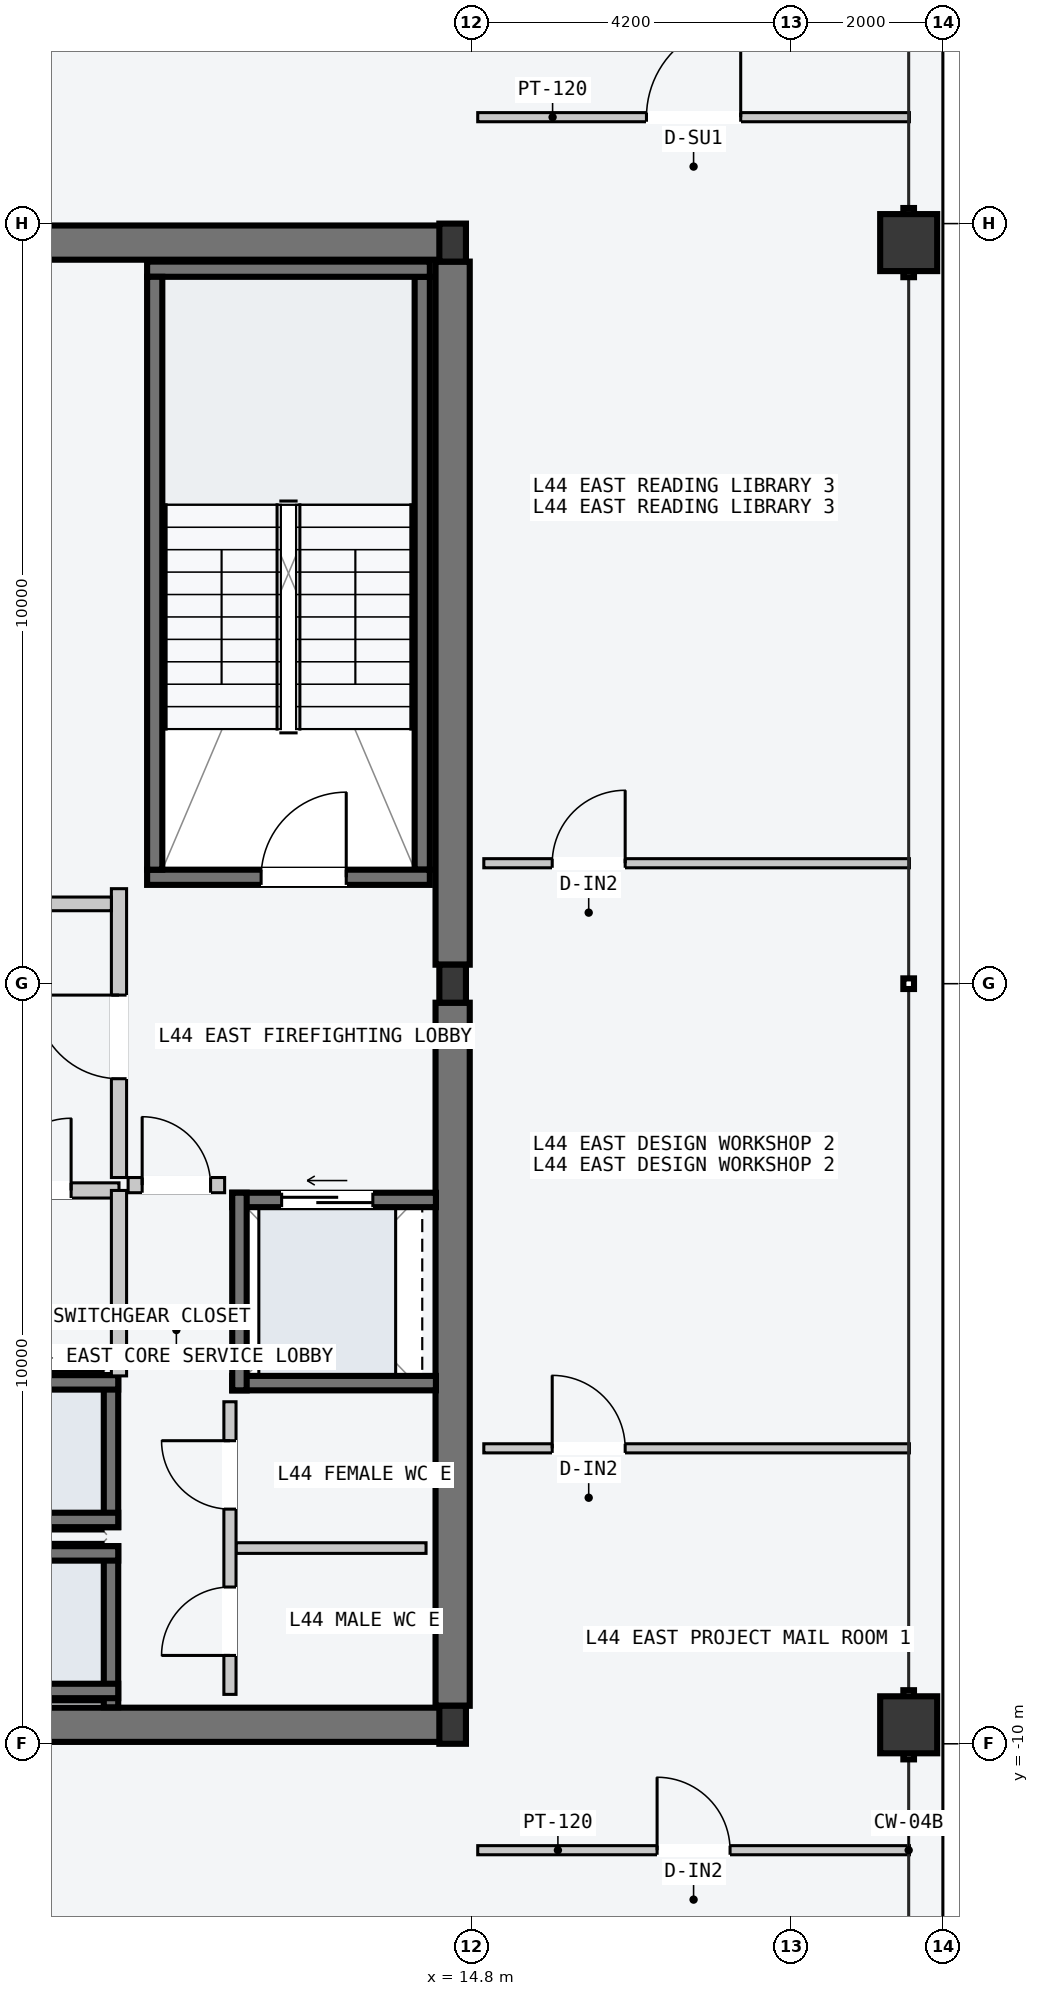
"""IFC4 building model, lengths in metres.
Left out: names, types, materials, properties, quantities, classifications, styles, units other than length and angle.
Written with IfcOpenShell. Run it as: python <this file> out.ifc"""

import sys

from ifc_helpers import new_model, si_unit, direction, frame, frame_2d, origin, origin_2d, place, context, subcontext, project, spatial, rectangle, hollow_rectangle, i_section, extrude, element, fill, save


model = new_model("IFC4")
c1 = context("Model", 3, precision=1e-05, world=origin(), true_north=direction((0.0, 1.0)))
c2 = subcontext(c1, "Body", "Model", "MODEL_VIEW")
j1 = project(units=[si_unit("LENGTHUNIT", "METRE"), si_unit("PLANEANGLEUNIT", "RADIAN")], contexts=[c1])
p1 = place(None, origin())
s1 = spatial("IfcSite", under=j1, at=p1, CompositionType="ELEMENT")
p2 = place(p1, origin())
s2 = spatial("IfcBuilding", under=s1, at=p2, CompositionType="ELEMENT")
p3 = place(p2, frame((0.0, 0.0, 169.5)))
s3 = spatial("IfcBuildingStorey", under=s2, at=p3, CompositionType="ELEMENT", Elevation=169.5)
for number, where, z_axis, x_axis in (
    (1, (8.07, -9.75, -0.2), (0.0, 0.0, 1.0), (1.0, 0.0, 0.0)),
    (2, (8.07, 9.75, -0.2), (0.0, 0.0, 1.0), (1.0, 0.0, 0.0)),
):
    element("IfcWall", number, at=place(p3, frame(where, z_axis=z_axis, x_axis=x_axis)), inside=s3, PredefinedType="SHEAR", context=c2, shape_type="SweptSolid", body=[
        extrude(rectangle(XDim=6.46, YDim=0.45, at=frame_2d((3.23, 0.0))), origin(), (0.0, 0.0, 1.0), 3.6),
    ])
for number, where, z_axis, x_axis in (
    (3, (14.55, -9.5, -0.2), (0.0, 0.0, 1.0), (0.0, 1.0, 0.0)),
    (4, (14.55, 0.25, -0.2), (0.0, 0.0, 1.0), (0.0, 1.0, 0.0)),
):
    element("IfcWall", number, at=place(p3, frame(where, z_axis=z_axis, x_axis=x_axis)), inside=s3, PredefinedType="SHEAR", context=c2, shape_type="SweptSolid", body=[
        extrude(rectangle(XDim=9.25, YDim=0.45, at=frame_2d((4.625, 0.0))), origin(), (0.0, 0.0, 1.0), 3.6),
    ])
p4 = place(p3, frame((14.15, 1.5, -0.2), z_axis=(0.0, 0.0, 1.0), x_axis=(0.0, 1.0, 0.0)))
e5 = element("IfcWall", 5, at=p4, inside=s3, PredefinedType="SOLIDWALL", context=c2, shape_type="SweptSolid", body=[
    extrude(rectangle(XDim=7.8, YDim=0.2, at=frame_2d((3.9, 0.0))), origin(), (0.0, 0.0, 1.0), 3.6),
])
p5 = place(p3, frame((10.53, 1.4, -0.2), z_axis=(0.0, 0.0, 1.0), x_axis=(1.0, 0.0, 0.0)))
e6 = element("IfcWall", 6, at=p5, inside=s3, PredefinedType="SOLIDWALL", context=c2, shape_type="SweptSolid", body=[
    extrude(rectangle(XDim=3.72, YDim=0.2, at=frame_2d((1.86, 0.0))), origin(), (0.0, 0.0, 1.0), 3.6),
])
p6 = place(p5, frame((1.5, 0.0, 0.2)))
e7 = element("IfcOpeningElement", 7, at=p6, cuts=e6, PredefinedType="OPENING", context=c2, shape_type="SweptSolid", body=[
    extrude(rectangle(XDim=1.12, YDim=2.18, at=frame_2d((0.56, 1.09))), frame((0.0, 0.11, 0.0), z_axis=(0.0, -1.0, 0.0), x_axis=(1.0, 0.0, 0.0)), (0.0, 0.0, 1.0), 0.22),
])
p7 = place(p3, frame((10.53, 9.4, -0.2), z_axis=(0.0, 0.0, 1.0), x_axis=(1.0, 0.0, 0.0)))
e8 = element("IfcWall", 8, at=p7, inside=s3, PredefinedType="SOLIDWALL", context=c2, shape_type="SweptSolid", body=[
    extrude(rectangle(XDim=3.72, YDim=0.2, at=frame_2d((1.86, 0.0))), origin(), (0.0, 0.0, 1.0), 3.6),
])
p8 = place(p3, frame((10.63, 1.5, -0.2), z_axis=(0.0, 0.0, 1.0), x_axis=(0.0, 1.0, 0.0)))
e9 = element("IfcWall", 9, at=p8, inside=s3, PredefinedType="SOLIDWALL", context=c2, shape_type="SweptSolid", body=[
    extrude(rectangle(XDim=7.8, YDim=0.2, at=frame_2d((3.9, 0.0))), origin(), (0.0, 0.0, 1.0), 3.6),
])
for number, where, z_axis, x_axis in (
    (10, (14.55, -9.75, 0.0), (0.0, 0.0, 1.0), (1.0, 0.0, 0.0)),
    (11, (14.55, 0.0, 0.0), (0.0, 0.0, 1.0), (1.0, 0.0, 0.0)),
    (12, (14.55, 9.75, 0.0), (0.0, 0.0, 1.0), (1.0, 0.0, 0.0)),
):
    element("IfcColumn", number, at=place(p3, frame(where, z_axis=z_axis, x_axis=x_axis)), inside=s3, PredefinedType="COLUMN", context=c2, shape_type="SweptSolid", body=[
        extrude(i_section(OverallWidth=0.35, OverallDepth=0.5, WebThickness=0.02, FlangeThickness=0.032, at=origin_2d()), origin(), (0.0, 0.0, 1.0), 3.6),
    ])
for number, where, z_axis, x_axis in (
    (13, (20.55, -9.75, 0.0), (0.0, 0.0, 1.0), (0.0, 1.0, 0.0)),
    (14, (20.55, 9.75, 0.0), (0.0, 0.0, 1.0), (0.0, 1.0, 0.0)),
):
    element("IfcColumn", number, at=place(p3, frame(where, z_axis=z_axis, x_axis=x_axis)), inside=s3, PredefinedType="COLUMN", context=c2, shape_type="SweptSolid", body=[
        extrude(hollow_rectangle(XDim=0.75, YDim=0.75, WallThickness=0.032, at=origin_2d()), origin(), (0.0, 0.0, 1.0), 3.6),
    ])
p9 = place(p3, frame((10.055, -9.52, -0.2), z_axis=(0.0, 0.0, 1.0), x_axis=(0.0, 1.0, 0.0)))
e15 = element("IfcWall", 15, at=p9, inside=s3, PredefinedType="SOLIDWALL", context=c2, shape_type="SweptSolid", body=[
    extrude(rectangle(XDim=2.12, YDim=0.19, at=frame_2d((1.06, 0.0))), origin(), (0.0, 0.0, 1.0), 3.6),
])
for number, where, z_axis, x_axis in (
    (16, (7.95, -7.495, -0.2), (0.0, 0.0, 1.0), (1.0, 0.0, 0.0)),
    (17, (7.95, -9.305, -0.2), (0.0, 0.0, 1.0), (1.0, 0.0, 0.0)),
):
    element("IfcWall", number, at=place(p3, frame(where, z_axis=z_axis, x_axis=x_axis)), inside=s3, PredefinedType="SOLIDWALL", context=c2, shape_type="SweptSolid", body=[
        extrude(rectangle(XDim=2.2, YDim=0.19, at=frame_2d((1.1, 0.0))), origin(), (0.0, 0.0, 1.0), 3.6),
    ])
p10 = place(p3, frame((10.055, -7.15, -0.2), z_axis=(0.0, 0.0, 1.0), x_axis=(0.0, 1.0, 0.0)))
e18 = element("IfcWall", 18, at=p10, inside=s3, PredefinedType="SOLIDWALL", context=c2, shape_type="SweptSolid", body=[
    extrude(rectangle(XDim=2.0, YDim=0.19, at=frame_2d((1.0, 0.0))), origin(), (0.0, 0.0, 1.0), 3.6),
])
for number, where, z_axis, x_axis in (
    (19, (7.95, -5.245, -0.2), (0.0, 0.0, 1.0), (1.0, 0.0, 0.0)),
    (20, (7.95, -7.055, -0.2), (0.0, 0.0, 1.0), (1.0, 0.0, 0.0)),
):
    element("IfcWall", number, at=place(p3, frame(where, z_axis=z_axis, x_axis=x_axis)), inside=s3, PredefinedType="SOLIDWALL", context=c2, shape_type="SweptSolid", body=[
        extrude(rectangle(XDim=2.2, YDim=0.19, at=frame_2d((1.1, 0.0))), origin(), (0.0, 0.0, 1.0), 3.6),
    ])
p11 = place(p3, frame((11.65, -2.845, -0.2), z_axis=(0.0, 0.0, 1.0), x_axis=(1.0, 0.0, 0.0)))
e21 = element("IfcWall", 21, at=p11, inside=s3, PredefinedType="SOLIDWALL", context=c2, shape_type="SweptSolid", body=[
    extrude(rectangle(XDim=2.68, YDim=0.19, at=frame_2d((1.34, 0.0))), origin(), (0.0, 0.0, 1.0), 3.6),
])
p12 = place(p11, frame((0.65, 0.0, 0.2)))
e22 = element("IfcOpeningElement", 22, at=p12, cuts=e21, PredefinedType="OPENING", context=c2, shape_type="SweptSolid", body=[
    extrude(rectangle(XDim=1.2, YDim=2.2, at=frame_2d((0.6, 1.1))), frame((0.0, 0.105, 0.0), z_axis=(0.0, -1.0, 0.0), x_axis=(1.0, 0.0, 0.0)), (0.0, 0.0, 1.0), 0.21),
])
p13 = place(p3, frame((11.65, -5.255, -0.2), z_axis=(0.0, 0.0, 1.0), x_axis=(1.0, 0.0, 0.0)))
e23 = element("IfcWall", 23, at=p13, inside=s3, PredefinedType="SOLIDWALL", context=c2, shape_type="SweptSolid", body=[
    extrude(rectangle(XDim=2.68, YDim=0.19, at=frame_2d((1.34, 0.0))), origin(), (0.0, 0.0, 1.0), 3.6),
])
p14 = place(p3, frame((11.745, -5.35, -0.2), z_axis=(0.0, 0.0, 1.0), x_axis=(0.0, 1.0, 0.0)))
e24 = element("IfcWall", 24, at=p14, inside=s3, PredefinedType="SOLIDWALL", context=c2, shape_type="SweptSolid", body=[
    extrude(rectangle(XDim=2.6, YDim=0.19, at=frame_2d((1.3, 0.0))), origin(), (0.0, 0.0, 1.0), 3.6),
])
p15 = place(p3, frame((10.16, -2.55, 0.0), z_axis=(0.0, 0.0, 1.0), x_axis=(0.0, 1.0, 0.0)))
e25 = element("IfcWall", 25, at=p15, inside=s3, PredefinedType="PARTITIONING", context=c2, shape_type="SweptSolid", body=[
    extrude(rectangle(XDim=3.8, YDim=0.2, at=frame_2d((1.9, 0.0))), origin(), (0.0, 0.0, 1.0), 3.4),
])
p16 = place(p15, frame((1.3, 0.0, 0.0)))
e26 = element("IfcOpeningElement", 26, at=p16, cuts=e25, PredefinedType="OPENING", context=c2, shape_type="SweptSolid", body=[
    extrude(rectangle(XDim=1.1, YDim=2.15, at=frame_2d((0.55, 1.075))), frame((0.0, 0.11, 0.0), z_axis=(0.0, -1.0, 0.0), x_axis=(1.0, 0.0, 0.0)), (0.0, 0.0, 1.0), 0.22),
])
p17 = place(p3, frame((10.28, -2.65, 0.0), z_axis=(0.0, 0.0, 1.0), x_axis=(1.0, 0.0, 0.0)))
e27 = element("IfcWall", 27, at=p17, inside=s3, PredefinedType="PARTITIONING", context=c2, shape_type="SweptSolid", body=[
    extrude(rectangle(XDim=1.27, YDim=0.2, at=frame_2d((0.635, 0.0))), origin(), (0.0, 0.0, 1.0), 3.4),
])
p18 = place(p17, frame((0.185, 0.0, 0.0)))
e28 = element("IfcOpeningElement", 28, at=p18, cuts=e27, PredefinedType="OPENING", context=c2, shape_type="SweptSolid", body=[
    extrude(rectangle(XDim=0.9, YDim=2.15, at=frame_2d((0.45, 1.075))), frame((0.0, 0.11, 0.0), z_axis=(0.0, -1.0, 0.0), x_axis=(1.0, 0.0, 0.0)), (0.0, 0.0, 1.0), 0.22),
])
p19 = place(p3, frame((7.96, -2.72, 0.0), z_axis=(0.0, 0.0, 1.0), x_axis=(1.0, 0.0, 0.0)))
e29 = element("IfcWall", 29, at=p19, inside=s3, PredefinedType="PARTITIONING", context=c2, shape_type="SweptSolid", body=[
    extrude(rectangle(XDim=2.2, YDim=0.2, at=frame_2d((1.1, 0.0))), origin(), (0.0, 0.0, 1.0), 3.4),
])
p20 = place(p19, frame((0.62, 0.0, 0.0)))
e30 = element("IfcOpeningElement", 30, at=p20, cuts=e29, PredefinedType="OPENING", context=c2, shape_type="SweptSolid", body=[
    extrude(rectangle(XDim=0.95, YDim=2.1, at=frame_2d((0.475, 1.05))), frame((0.0, 0.11, 0.0), z_axis=(0.0, -1.0, 0.0), x_axis=(1.0, 0.0, 0.0)), (0.0, 0.0, 1.0), 0.22),
])
p21 = place(p3, frame((10.16, -5.16, 0.0), z_axis=(0.0, 0.0, 1.0), x_axis=(0.0, 1.0, 0.0)))
e31 = element("IfcWall", 31, at=p21, inside=s3, PredefinedType="PARTITIONING", context=c2, shape_type="SweptSolid", body=[
    extrude(rectangle(XDim=2.44, YDim=0.2, at=frame_2d((1.22, 0.0))), origin(), (0.0, 0.0, 1.0), 3.4),
])
p22 = place(p3, frame((11.7, -7.425, 0.0), z_axis=(0.0, 0.0, 1.0), x_axis=(1.0, 0.0, 0.0)))
e32 = element("IfcWall", 32, at=p22, inside=s3, PredefinedType="PARTITIONING", context=c2, shape_type="SweptSolid", body=[
    extrude(rectangle(XDim=2.5, YDim=0.14, at=frame_2d((1.25, 0.0))), origin(), (0.0, 0.0, 1.0), 3.4),
])
p23 = place(p3, frame((11.62, -9.35, 0.0), z_axis=(0.0, 0.0, 1.0), x_axis=(0.0, 1.0, 0.0)))
e33 = element("IfcWall", 33, at=p23, inside=s3, PredefinedType="PARTITIONING", context=c2, shape_type="SweptSolid", body=[
    extrude(rectangle(XDim=3.85, YDim=0.16, at=frame_2d((1.925, 0.0))), origin(), (0.0, 0.0, 1.0), 3.4),
])
p24 = place(p23, frame((0.512, 0.0, 0.0)))
e34 = element("IfcOpeningElement", 34, at=p24, cuts=e33, PredefinedType="OPENING", context=c2, shape_type="SweptSolid", body=[
    extrude(rectangle(XDim=0.9, YDim=2.15, at=frame_2d((0.45, 1.075))), frame((0.0, 0.09, 0.0), z_axis=(0.0, -1.0, 0.0), x_axis=(1.0, 0.0, 0.0)), (0.0, 0.0, 1.0), 0.18),
])
p25 = place(p23, frame((2.438, 0.0, 0.0)))
e35 = element("IfcOpeningElement", 35, at=p25, cuts=e33, PredefinedType="OPENING", context=c2, shape_type="SweptSolid", body=[
    extrude(rectangle(XDim=0.9, YDim=2.15, at=frame_2d((0.45, 1.075))), frame((0.0, 0.09, 0.0), z_axis=(0.0, -1.0, 0.0), x_axis=(1.0, 0.0, 0.0)), (0.0, 0.0, 1.0), 0.18),
])
p26 = place(p3, frame((1.26, 1.05, 0.0), z_axis=(0.0, 0.0, 1.0), x_axis=(1.0, 0.0, 0.0)))
e36 = element("IfcWall", 36, at=p26, inside=s3, PredefinedType="PARTITIONING", context=c2, shape_type="SweptSolid", body=[
    extrude(rectangle(XDim=8.8, YDim=0.18, at=frame_2d((4.4, 0.0))), origin(), (0.0, 0.0, 1.0), 3.4),
])
p27 = place(p3, frame((14.88, 11.4, 0.0), z_axis=(0.0, 0.0, 1.0), x_axis=(1.0, 0.0, 0.0)))
e37 = element("IfcWall", 37, at=p27, inside=s3, PredefinedType="PARTITIONING", context=c2, shape_type="SweptSolid", body=[
    extrude(rectangle(XDim=5.68, YDim=0.12, at=frame_2d((2.84, 0.0))), origin(), (0.0, 0.0, 1.0), 3.4),
])
p28 = place(p27, frame((2.22, 0.0, 0.0)))
e38 = element("IfcOpeningElement", 38, at=p28, cuts=e37, PredefinedType="OPENING", context=c2, shape_type="SweptSolid", body=[
    extrude(rectangle(XDim=1.24, YDim=2.24, at=frame_2d((0.62, 1.12))), frame((0.0, 0.07, 0.0), z_axis=(0.0, -1.0, 0.0), x_axis=(1.0, 0.0, 0.0)), (0.0, 0.0, 1.0), 0.14),
])
p29 = place(p3, frame((14.88, -11.4, 0.0), z_axis=(0.0, 0.0, 1.0), x_axis=(1.0, 0.0, 0.0)))
e39 = element("IfcWall", 39, at=p29, inside=s3, PredefinedType="PARTITIONING", context=c2, shape_type="SweptSolid", body=[
    extrude(rectangle(XDim=5.68, YDim=0.12, at=frame_2d((2.84, 0.0))), origin(), (0.0, 0.0, 1.0), 3.4),
])
p30 = place(p29, frame((2.36, 0.0, 0.0)))
e40 = element("IfcOpeningElement", 40, at=p30, cuts=e39, PredefinedType="OPENING", context=c2, shape_type="SweptSolid", body=[
    extrude(rectangle(XDim=0.96, YDim=2.18, at=frame_2d((0.48, 1.09))), frame((0.0, 0.07, 0.0), z_axis=(0.0, -1.0, 0.0), x_axis=(1.0, 0.0, 0.0)), (0.0, 0.0, 1.0), 0.14),
])
p31 = place(p3, frame((14.96, -6.113, 0.0), z_axis=(0.0, 0.0, 1.0), x_axis=(1.0, 0.0, 0.0)))
e41 = element("IfcWall", 41, at=p31, inside=s3, PredefinedType="PARTITIONING", context=c2, shape_type="SweptSolid", body=[
    extrude(rectangle(XDim=5.6, YDim=0.12, at=frame_2d((2.8, 0.0))), origin(), (0.0, 0.0, 1.0), 3.4),
])
p32 = place(p31, frame((0.9, 0.0, 0.0)))
e42 = element("IfcOpeningElement", 42, at=p32, cuts=e41, PredefinedType="OPENING", context=c2, shape_type="SweptSolid", body=[
    extrude(rectangle(XDim=0.96, YDim=2.18, at=frame_2d((0.48, 1.09))), frame((0.0, 0.07, 0.0), z_axis=(0.0, -1.0, 0.0), x_axis=(1.0, 0.0, 0.0)), (0.0, 0.0, 1.0), 0.14),
])
p33 = place(p3, frame((14.96, 1.585, 0.0), z_axis=(0.0, 0.0, 1.0), x_axis=(1.0, 0.0, 0.0)))
e43 = element("IfcWall", 43, at=p33, inside=s3, PredefinedType="PARTITIONING", context=c2, shape_type="SweptSolid", body=[
    extrude(rectangle(XDim=5.6, YDim=0.12, at=frame_2d((2.8, 0.0))), origin(), (0.0, 0.0, 1.0), 3.4),
])
p34 = place(p33, frame((0.9, 0.0, 0.0)))
e44 = element("IfcOpeningElement", 44, at=p34, cuts=e43, PredefinedType="OPENING", context=c2, shape_type="SweptSolid", body=[
    extrude(rectangle(XDim=0.96, YDim=2.18, at=frame_2d((0.48, 1.09))), frame((0.0, 0.07, 0.0), z_axis=(0.0, -1.0, 0.0), x_axis=(1.0, 0.0, 0.0)), (0.0, 0.0, 1.0), 0.14),
])
p35 = place(p6, origin())
e45 = element("IfcDoor", 45, at=p35, inside=s3, OperationType="SINGLE_SWING_RIGHT", PredefinedType="DOOR", context=c2, shape_type="SweptSolid", body=[
    extrude(rectangle(XDim=1.12, YDim=2.18, at=frame_2d((0.56, 1.09))), frame((0.0, 0.025, 0.0), z_axis=(0.0, -1.0, 0.0), x_axis=(1.0, 0.0, 0.0)), (0.0, 0.0, 1.0), 0.05),
])
fill(e7, e45)
p36 = place(p12, origin())
e46 = element("IfcDoor", 46, at=p36, inside=s3, OperationType="SLIDING_TO_LEFT", PredefinedType="DOOR", context=c2, shape_type="SweptSolid", body=[
    extrude(rectangle(XDim=1.2, YDim=2.2, at=frame_2d((0.6, 1.1))), frame((0.0, 0.025, 0.0), z_axis=(0.0, -1.0, 0.0), x_axis=(1.0, 0.0, 0.0)), (0.0, 0.0, 1.0), 0.05),
])
fill(e22, e46)
p37 = place(p16, origin())
e47 = element("IfcDoor", 47, at=p37, inside=s3, OperationType="SINGLE_SWING_RIGHT", PredefinedType="DOOR", context=c2, shape_type="SweptSolid", body=[
    extrude(rectangle(XDim=1.1, YDim=2.15, at=frame_2d((0.55, 1.075))), frame((0.0, 0.025, 0.0), z_axis=(0.0, -1.0, 0.0), x_axis=(1.0, 0.0, 0.0)), (0.0, 0.0, 1.0), 0.05),
])
fill(e26, e47)
p38 = place(p18, origin())
e48 = element("IfcDoor", 48, at=p38, inside=s3, OperationType="SINGLE_SWING_LEFT", PredefinedType="DOOR", context=c2, shape_type="SweptSolid", body=[
    extrude(rectangle(XDim=0.9, YDim=2.15, at=frame_2d((0.45, 1.075))), frame((0.0, 0.025, 0.0), z_axis=(0.0, -1.0, 0.0), x_axis=(1.0, 0.0, 0.0)), (0.0, 0.0, 1.0), 0.05),
])
fill(e28, e48)
p39 = place(p20, origin())
e49 = element("IfcDoor", 49, at=p39, inside=s3, OperationType="SINGLE_SWING_RIGHT", PredefinedType="DOOR", context=c2, shape_type="SweptSolid", body=[
    extrude(rectangle(XDim=0.95, YDim=2.1, at=frame_2d((0.475, 1.05))), frame((0.0, 0.025, 0.0), z_axis=(0.0, -1.0, 0.0), x_axis=(1.0, 0.0, 0.0)), (0.0, 0.0, 1.0), 0.05),
])
fill(e30, e49)
p40 = place(p24, origin())
e50 = element("IfcDoor", 50, at=p40, inside=s3, OperationType="SINGLE_SWING_LEFT", PredefinedType="DOOR", context=c2, shape_type="SweptSolid", body=[
    extrude(rectangle(XDim=0.9, YDim=2.15, at=frame_2d((0.45, 1.075))), frame((0.0, 0.025, 0.0), z_axis=(0.0, -1.0, 0.0), x_axis=(1.0, 0.0, 0.0)), (0.0, 0.0, 1.0), 0.05),
])
fill(e34, e50)
p41 = place(p25, origin())
e51 = element("IfcDoor", 51, at=p41, inside=s3, OperationType="SINGLE_SWING_RIGHT", PredefinedType="DOOR", context=c2, shape_type="SweptSolid", body=[
    extrude(rectangle(XDim=0.9, YDim=2.15, at=frame_2d((0.45, 1.075))), frame((0.0, 0.025, 0.0), z_axis=(0.0, -1.0, 0.0), x_axis=(1.0, 0.0, 0.0)), (0.0, 0.0, 1.0), 0.05),
])
fill(e35, e51)
p42 = place(p28, origin())
e52 = element("IfcDoor", 52, at=p42, inside=s3, OperationType="SINGLE_SWING_RIGHT", PredefinedType="DOOR", context=c2, shape_type="SweptSolid", body=[
    extrude(rectangle(XDim=1.24, YDim=2.24, at=frame_2d((0.62, 1.12))), frame((0.0, 0.025, 0.0), z_axis=(0.0, -1.0, 0.0), x_axis=(1.0, 0.0, 0.0)), (0.0, 0.0, 1.0), 0.05),
])
fill(e38, e52)
p43 = place(p30, origin())
e53 = element("IfcDoor", 53, at=p43, inside=s3, OperationType="SINGLE_SWING_LEFT", PredefinedType="DOOR", context=c2, shape_type="SweptSolid", body=[
    extrude(rectangle(XDim=0.96, YDim=2.18, at=frame_2d((0.48, 1.09))), frame((0.0, 0.025, 0.0), z_axis=(0.0, -1.0, 0.0), x_axis=(1.0, 0.0, 0.0)), (0.0, 0.0, 1.0), 0.05),
])
fill(e40, e53)
p44 = place(p32, origin())
e54 = element("IfcDoor", 54, at=p44, inside=s3, OperationType="SINGLE_SWING_LEFT", PredefinedType="DOOR", context=c2, shape_type="SweptSolid", body=[
    extrude(rectangle(XDim=0.96, YDim=2.18, at=frame_2d((0.48, 1.09))), frame((0.0, 0.025, 0.0), z_axis=(0.0, -1.0, 0.0), x_axis=(1.0, 0.0, 0.0)), (0.0, 0.0, 1.0), 0.05),
])
fill(e42, e54)
p45 = place(p34, origin())
e55 = element("IfcDoor", 55, at=p45, inside=s3, OperationType="SINGLE_SWING_RIGHT", PredefinedType="DOOR", context=c2, shape_type="SweptSolid", body=[
    extrude(rectangle(XDim=0.96, YDim=2.18, at=frame_2d((0.48, 1.09))), frame((0.0, 0.025, 0.0), z_axis=(0.0, -1.0, 0.0), x_axis=(1.0, 0.0, 0.0)), (0.0, 0.0, 1.0), 0.05),
])
fill(e44, e55)
save(model, sys.argv[1])
